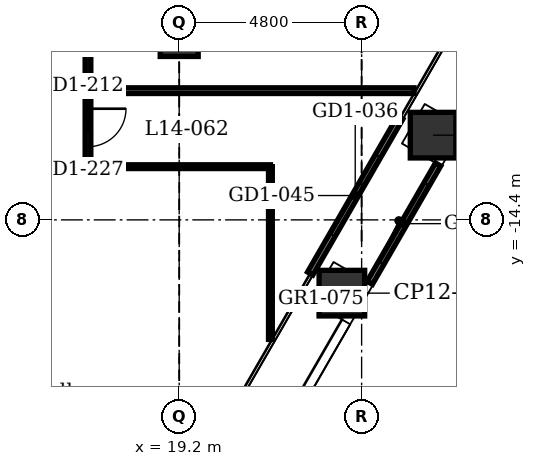
"""IFC4 building model, lengths in metres.
Left out: names, types, materials, properties, quantities, classifications, styles, units other than length and angle.
Written with IfcOpenShell. Run it as: python <this file> out.ifc"""

import sys

from ifc_helpers import new_model, si_unit, direction, frame, frame_2d, origin, origin_2d, place, context, subcontext, project, spatial, rectangle, extrude, element, fill, save


model = new_model("IFC4")
c1 = context("Model", 3, precision=1e-05, world=origin(), true_north=direction((0.0, 1.0)))
c2 = subcontext(c1, "Body", "Model", "MODEL_VIEW")
j1 = project(units=[si_unit("LENGTHUNIT", "METRE"), si_unit("PLANEANGLEUNIT", "RADIAN")], contexts=[c1])
p1 = place(None, origin())
s1 = spatial("IfcSite", under=j1, at=p1, CompositionType="ELEMENT")
p2 = place(p1, origin())
s2 = spatial("IfcBuilding", under=s1, at=p2, CompositionType="ELEMENT")
p3 = place(p2, frame((0.0, 0.0, 77.9)))
s3 = spatial("IfcBuildingStorey", under=s2, at=p3, CompositionType="ELEMENT", Elevation=77.9)
for number, where, z_axis, x_axis in (
    (1, (25.88, -12.171, -0.2), (0.0, 0.0, 1.0), (0.5, 0.866, 0.0)),
    (2, (23.48, -16.328, -0.2), (0.0, 0.0, 1.0), (0.5, 0.866, 0.0)),
):
    element("IfcColumn", number, at=place(p3, frame(where, z_axis=z_axis, x_axis=x_axis)), inside=s3, PredefinedType="COLUMN", context=c2, shape_type="SweptSolid", body=[
        extrude(rectangle(XDim=1.2, YDim=1.2, at=origin_2d()), origin(), (0.0, 0.0, 1.0), 4.5),
    ])
p4 = place(p3, frame((19.2, -9.6, -0.2), z_axis=(0.0, 0.0, 1.0), x_axis=(1.0, 0.0, 0.0)))
e3 = element("IfcColumn", 3, at=p4, inside=s3, PredefinedType="COLUMN", context=c2, shape_type="SweptSolid", body=[
    extrude(rectangle(XDim=1.0, YDim=1.0, at=origin_2d()), origin(), (0.0, 0.0, 1.0), 4.5),
])
p5 = place(p3, frame((25.017, -11.707, 0.0), z_axis=(0.0, 0.0, 1.0), x_axis=(-0.499978080042, -0.866038058908, 0.0)))
e4 = element("IfcWall", 4, at=p5, inside=s3, PredefinedType="PARTITIONING", context=c2, shape_type="SweptSolid", body=[
    extrude(rectangle(XDim=4.74, YDim=0.16, at=frame_2d((2.37, 0.0))), origin(), (0.0, 0.0, 1.0), 4.3),
])
p6 = place(p5, frame((1.17, 0.0, 0.0)))
e5 = element("IfcOpeningElement", 5, at=p6, cuts=e4, PredefinedType="OPENING", context=c2, shape_type="SweptSolid", body=[
    extrude(rectangle(XDim=2.4, YDim=2.4, at=frame_2d((1.2, 1.2))), frame((0.0, 0.09, 0.0), z_axis=(0.0, -1.0, 0.0), x_axis=(1.0, 0.0, 0.0)), (0.0, 0.0, 1.0), 0.18),
])
p7 = place(p3, frame((26.012, -12.942, 0.0), z_axis=(0.0, 0.0, 1.0), x_axis=(-0.500016292001, -0.866015997389, 0.0)))
e6 = element("IfcWall", 6, at=p7, inside=s3, PredefinedType="PARTITIONING", context=c2, shape_type="SweptSolid", body=[
    extrude(rectangle(XDim=3.596, YDim=0.16, at=frame_2d((1.798, 0.0))), origin(), (0.0, 0.0, 1.0), 3.2),
])
p8 = place(p7, frame((0.598, 0.0, 0.0)))
e7 = element("IfcOpeningElement", 7, at=p8, cuts=e6, PredefinedType="OPENING", context=c2, shape_type="SweptSolid", body=[
    extrude(rectangle(XDim=2.4, YDim=2.4, at=frame_2d((1.2, 1.2))), frame((0.0, 0.09, 0.0), z_axis=(0.0, -1.0, 0.0), x_axis=(1.0, 0.0, 0.0)), (0.0, 0.0, 1.0), 0.18),
])
p9 = place(p3, frame((21.6, -17.545, 0.0), z_axis=(0.0, 0.0, 1.0), x_axis=(0.0, 1.0, 0.0)))
e8 = element("IfcWall", 8, at=p9, inside=s3, PredefinedType="PARTITIONING", context=c2, shape_type="SweptSolid", body=[
    extrude(rectangle(XDim=4.545, YDim=0.1, at=frame_2d((2.272, 0.0))), origin(), (0.0, 0.0, 1.0), 4.3),
])
p10 = place(p3, frame((16.8, -13.0, 0.0), z_axis=(0.0, 0.0, 1.0), x_axis=(0.0, 1.0, 0.0)))
e9 = element("IfcWall", 9, at=p10, inside=s3, PredefinedType="PARTITIONING", context=c2, shape_type="SweptSolid", body=[
    extrude(rectangle(XDim=9.05, YDim=0.15, at=frame_2d((4.525, 0.0))), origin(), (0.0, 0.0, 1.0), 4.3),
])
p11 = place(p10, frame((0.525, 0.0, 0.0)))
e10 = element("IfcOpeningElement", 10, at=p11, cuts=e9, PredefinedType="OPENING", context=c2, shape_type="SweptSolid", body=[
    extrude(rectangle(XDim=1.0, YDim=2.1, at=frame_2d((0.5, 1.05))), frame((0.0, 0.085, 0.0), z_axis=(0.0, -1.0, 0.0), x_axis=(1.0, 0.0, 0.0)), (0.0, 0.0, 1.0), 0.17),
])
p12 = place(p10, frame((5.8, 0.0, 0.0)))
e11 = element("IfcOpeningElement", 11, at=p12, cuts=e9, PredefinedType="OPENING", context=c2, shape_type="SweptSolid", body=[
    extrude(rectangle(XDim=1.0, YDim=2.1, at=frame_2d((0.5, 1.05))), frame((0.0, 0.085, 0.0), z_axis=(0.0, -1.0, 0.0), x_axis=(1.0, 0.0, 0.0)), (0.0, 0.0, 1.0), 0.17),
])
p13 = place(p3, frame((16.8, -13.0, 0.0), z_axis=(0.0, 0.0, 1.0), x_axis=(1.0, 0.0, 0.0)))
e12 = element("IfcWall", 12, at=p13, inside=s3, PredefinedType="PARTITIONING", context=c2, shape_type="SweptSolid", body=[
    extrude(rectangle(XDim=4.8, YDim=0.1, at=frame_2d((2.4, 0.0))), origin(), (0.0, 0.0, 1.0), 4.3),
])
p14 = place(p3, frame((-21.6, -13.0, 0.0), z_axis=(0.0, 0.0, 1.0), x_axis=(1.0, 0.0, 0.0)))
e13 = element("IfcWall", 13, at=p14, inside=s3, PredefinedType="PARTITIONING", context=c2, shape_type="SweptSolid", body=[
    extrude(rectangle(XDim=38.4, YDim=0.15, at=frame_2d((19.2, 0.0))), origin(), (0.0, 0.0, 1.0), 4.3),
])
p15 = place(p14, frame((6.265, 0.0, 0.0)))
e14 = element("IfcOpeningElement", 14, at=p15, cuts=e13, PredefinedType="OPENING", context=c2, shape_type="SweptSolid", body=[
    extrude(rectangle(XDim=1.0, YDim=2.1, at=frame_2d((0.5, 1.05))), frame((0.0, 0.085, 0.0), z_axis=(0.0, -1.0, 0.0), x_axis=(1.0, 0.0, 0.0)), (0.0, 0.0, 1.0), 0.17),
])
p16 = place(p14, frame((10.3, 0.0, 0.0)))
e15 = element("IfcOpeningElement", 15, at=p16, cuts=e13, PredefinedType="OPENING", context=c2, shape_type="SweptSolid", body=[
    extrude(rectangle(XDim=1.0, YDim=2.1, at=frame_2d((0.5, 1.05))), frame((0.0, 0.085, 0.0), z_axis=(0.0, -1.0, 0.0), x_axis=(1.0, 0.0, 0.0)), (0.0, 0.0, 1.0), 0.17),
])
p17 = place(p14, frame((13.9, 0.0, 0.0)))
e16 = element("IfcOpeningElement", 16, at=p17, cuts=e13, PredefinedType="OPENING", context=c2, shape_type="SweptSolid", body=[
    extrude(rectangle(XDim=1.0, YDim=2.1, at=frame_2d((0.5, 1.05))), frame((0.0, 0.085, 0.0), z_axis=(0.0, -1.0, 0.0), x_axis=(1.0, 0.0, 0.0)), (0.0, 0.0, 1.0), 0.17),
])
p18 = place(p14, frame((18.7, 0.0, 0.0)))
e17 = element("IfcOpeningElement", 17, at=p18, cuts=e13, PredefinedType="OPENING", context=c2, shape_type="SweptSolid", body=[
    extrude(rectangle(XDim=1.0, YDim=2.1, at=frame_2d((0.5, 1.05))), frame((0.0, 0.085, 0.0), z_axis=(0.0, -1.0, 0.0), x_axis=(1.0, 0.0, 0.0)), (0.0, 0.0, 1.0), 0.17),
])
p19 = place(p14, frame((28.815, 0.0, 0.0)))
e18 = element("IfcOpeningElement", 18, at=p19, cuts=e13, PredefinedType="OPENING", context=c2, shape_type="SweptSolid", body=[
    extrude(rectangle(XDim=1.0, YDim=2.1, at=frame_2d((0.5, 1.05))), frame((0.0, 0.085, 0.0), z_axis=(0.0, -1.0, 0.0), x_axis=(1.0, 0.0, 0.0)), (0.0, 0.0, 1.0), 0.17),
])
p20 = place(p14, frame((35.095, 0.0, 0.0)))
e19 = element("IfcOpeningElement", 19, at=p20, cuts=e13, PredefinedType="OPENING", context=c2, shape_type="SweptSolid", body=[
    extrude(rectangle(XDim=1.0, YDim=2.1, at=frame_2d((0.5, 1.05))), frame((0.0, 0.085, 0.0), z_axis=(0.0, -1.0, 0.0), x_axis=(1.0, 0.0, 0.0)), (0.0, 0.0, 1.0), 0.17),
])
p21 = place(p14, frame((23.55, 0.0, 0.0)))
e20 = element("IfcOpeningElement", 20, at=p21, cuts=e13, PredefinedType="OPENING", context=c2, shape_type="SweptSolid", body=[
    extrude(rectangle(XDim=0.9, YDim=2.1, at=frame_2d((0.45, 1.05))), frame((0.0, 0.085, 0.0), z_axis=(0.0, -1.0, 0.0), x_axis=(1.0, 0.0, 0.0)), (0.0, 0.0, 1.0), 0.17),
])
p22 = place(p14, frame((26.55, 0.0, 0.0)))
e21 = element("IfcOpeningElement", 21, at=p22, cuts=e13, PredefinedType="OPENING", context=c2, shape_type="SweptSolid", body=[
    extrude(rectangle(XDim=0.9, YDim=2.1, at=frame_2d((0.45, 1.05))), frame((0.0, 0.085, 0.0), z_axis=(0.0, -1.0, 0.0), x_axis=(1.0, 0.0, 0.0)), (0.0, 0.0, 1.0), 0.17),
])
p23 = place(p14, frame((32.2, 0.0, 0.9)))
e22 = element("IfcOpeningElement", 22, at=p23, cuts=e13, PredefinedType="OPENING", context=c2, shape_type="SweptSolid", body=[
    extrude(rectangle(XDim=1.8, YDim=1.5, at=frame_2d((0.9, 0.75))), frame((0.0, 0.085, 0.0), z_axis=(0.0, -1.0, 0.0), x_axis=(1.0, 0.0, 0.0)), (0.0, 0.0, 1.0), 0.17),
])
p24 = place(p3, frame((16.8, -11.0, 0.0), z_axis=(0.0, 0.0, 1.0), x_axis=(1.0, 0.0, 0.0)))
e23 = element("IfcWall", 23, at=p24, inside=s3, PredefinedType="PARTITIONING", context=c2, shape_type="SweptSolid", body=[
    extrude(rectangle(XDim=8.578, YDim=0.15, at=frame_2d((4.289, 0.0))), origin(), (0.0, 0.0, 1.0), 4.3),
])
p25 = place(p6, origin())
e24 = element("IfcDoor", 24, at=p25, inside=s3, OperationType="DOUBLE_DOOR_SLIDING", PredefinedType="DOOR", context=c2, shape_type="SweptSolid", body=[
    extrude(rectangle(XDim=2.4, YDim=2.4, at=frame_2d((1.2, 1.2))), frame((0.0, 0.025, 0.0), z_axis=(0.0, -1.0, 0.0), x_axis=(1.0, 0.0, 0.0)), (0.0, 0.0, 1.0), 0.05),
])
fill(e5, e24)
p26 = place(p8, origin())
e25 = element("IfcDoor", 25, at=p26, inside=s3, OperationType="DOUBLE_DOOR_SLIDING", PredefinedType="DOOR", context=c2, shape_type="SweptSolid", body=[
    extrude(rectangle(XDim=2.4, YDim=2.4, at=frame_2d((1.2, 1.2))), frame((0.0, 0.025, 0.0), z_axis=(0.0, -1.0, 0.0), x_axis=(1.0, 0.0, 0.0)), (0.0, 0.0, 1.0), 0.05),
])
fill(e7, e25)
p27 = place(p11, frame((1.0, 0.0, 0.0), z_axis=(0.0, 0.0, 1.0), x_axis=(-1.0, 0.0, 0.0)))
e26 = element("IfcDoor", 26, at=p27, inside=s3, OperationType="SINGLE_SWING_RIGHT", PredefinedType="DOOR", context=c2, shape_type="SweptSolid", body=[
    extrude(rectangle(XDim=1.0, YDim=2.1, at=frame_2d((0.5, 1.05))), frame((0.0, 0.025, 0.0), z_axis=(0.0, -1.0, 0.0), x_axis=(1.0, 0.0, 0.0)), (0.0, 0.0, 1.0), 0.05),
])
fill(e10, e26)
save(model, sys.argv[1])
